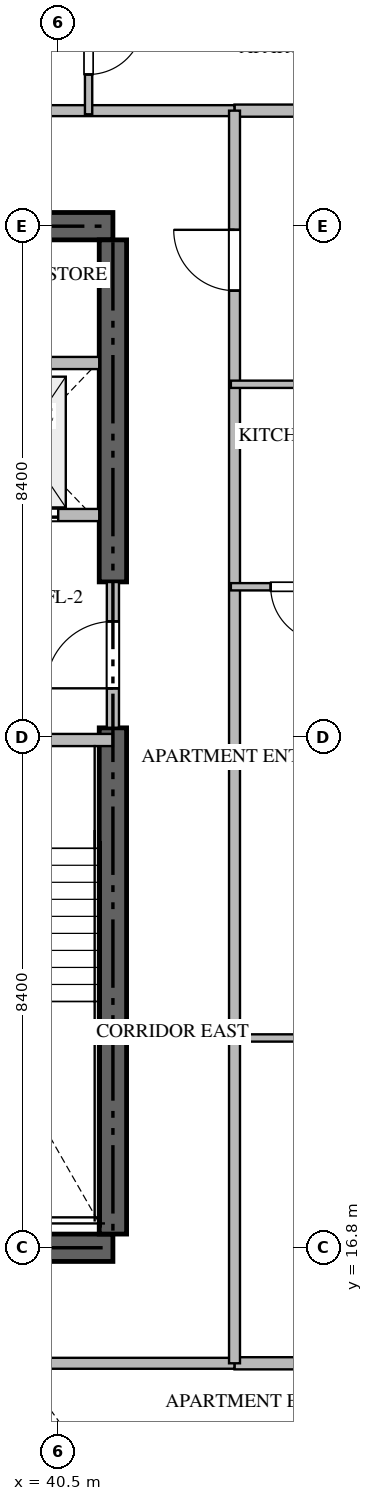
"""IFC4 building model, lengths in metres.
Left out: names, types, materials, properties, quantities, classifications, styles, units other than length and angle.
Written with IfcOpenShell. Run it as: python <this file> out.ifc"""

import sys

from ifc_helpers import new_model, si_unit, direction, frame, frame_2d, origin, place, context, subcontext, project, spatial, rectangle, extrude, source, transform, mapped, element, fill, save


model = new_model("IFC4")
c1 = context("Model", 3, precision=1e-05, world=origin(), true_north=direction((0.0, 1.0)))
c2 = subcontext(c1, "Body", "Model", "MODEL_VIEW")
j1 = project(units=[si_unit("LENGTHUNIT", "METRE"), si_unit("PLANEANGLEUNIT", "RADIAN")], contexts=[c1])
p1 = place(None, origin())
s1 = spatial("IfcSite", under=j1, at=p1, CompositionType="ELEMENT")
p2 = place(p1, origin())
s2 = spatial("IfcBuilding", under=s1, at=p2, CompositionType="ELEMENT")
p3 = place(p2, frame((0.0, 0.0, 94.2)))
s3 = spatial("IfcBuildingStorey", under=s2, at=p3, CompositionType="ELEMENT", Elevation=94.2)
for number, where, z_axis, x_axis in (
    (1, (23.4, 16.8, -0.26), (0.0, 0.0, 1.0), (1.0, 0.0, 0.0)),
    (2, (41.4, 33.6, -0.26), (0.0, 0.0, 1.0), (-1.0, 0.0, 0.0)),
):
    element("IfcWall", number, at=place(p3, frame(where, z_axis=z_axis, x_axis=x_axis)), inside=s3, PredefinedType="SHEAR", context=c2, shape_type="SweptSolid", body=[
        extrude(rectangle(XDim=18.0, YDim=0.45, at=frame_2d((9.0, 0.0))), origin(), (0.0, 0.0, 1.0), 3.748),
    ])
p4 = place(p3, frame((41.4, 17.025, -0.26), z_axis=(0.0, 0.0, 1.0), x_axis=(0.0, 1.0, 0.0)))
e3 = element("IfcWall", 3, at=p4, inside=s3, PredefinedType="SHEAR", context=c2, shape_type="SweptSolid", body=[
    extrude(rectangle(XDim=8.325, YDim=0.45, at=frame_2d((4.163, 0.0))), origin(), (0.0, 0.0, 1.0), 3.748),
])
p5 = place(p3, frame((41.4, 27.75, -0.26), z_axis=(0.0, 0.0, 1.0), x_axis=(0.0, 1.0, 0.0)))
e4 = element("IfcWall", 4, at=p5, inside=s3, PredefinedType="SHEAR", context=c2, shape_type="SweptSolid", body=[
    extrude(rectangle(XDim=5.625, YDim=0.45, at=frame_2d((2.812, 0.0))), origin(), (0.0, 0.0, 1.0), 3.748),
])
p6 = place(p3, frame((36.95, 25.15, 0.0), z_axis=(0.0, 0.0, 1.0), x_axis=(1.0, 0.0, 0.0)))
e5 = element("IfcWall", 5, at=p6, inside=s3, PredefinedType="STANDARD", context=c2, shape_type="SweptSolid", body=[
    extrude(rectangle(XDim=4.45, YDim=0.2, at=frame_2d((2.225, 0.0))), origin(), (0.0, 0.0, 1.0), 3.49),
])
p7 = place(p6, frame((1.65, 0.0, 0.0)))
e6 = element("IfcOpeningElement", 6, at=p7, cuts=e5, PredefinedType="OPENING", context=c2, shape_type="SweptSolid", body=[
    extrude(rectangle(XDim=1.1, YDim=2.15, at=frame_2d((0.55, 1.075))), frame((0.0, 0.11, 0.0), z_axis=(0.0, -1.0, 0.0), x_axis=(1.0, 0.0, 0.0)), (0.0, 0.0, 1.0), 0.22),
])
p8 = place(p3, frame((38.75, 28.85, 0.0), z_axis=(0.0, 0.0, 1.0), x_axis=(1.0, 0.0, 0.0)))
e7 = element("IfcWall", 7, at=p8, inside=s3, PredefinedType="STANDARD", context=c2, shape_type="SweptSolid", body=[
    extrude(rectangle(XDim=2.425, YDim=0.2, at=frame_2d((1.212, 0.0))), origin(), (0.0, 0.0, 1.0), 3.49),
])
p9 = place(p8, frame((0.55, 0.0, 0.0)))
e8 = element("IfcOpeningElement", 8, at=p9, cuts=e7, PredefinedType="OPENING", context=c2, shape_type="SweptSolid", body=[
    extrude(rectangle(XDim=1.2, YDim=2.2, at=frame_2d((0.6, 1.1))), frame((0.0, 0.11, 0.0), z_axis=(0.0, -1.0, 0.0), x_axis=(1.0, 0.0, 0.0)), (0.0, 0.0, 1.0), 0.22),
])
p10 = place(p3, frame((38.75, 31.35, 0.0), z_axis=(0.0, 0.0, 1.0), x_axis=(1.0, 0.0, 0.0)))
e9 = element("IfcWall", 9, at=p10, inside=s3, PredefinedType="STANDARD", context=c2, shape_type="SweptSolid", body=[
    extrude(rectangle(XDim=2.425, YDim=0.2, at=frame_2d((1.212, 0.0))), origin(), (0.0, 0.0, 1.0), 3.49),
])
p11 = place(p3, frame((41.4, 25.352, 0.0), z_axis=(0.0, 0.0, 1.0), x_axis=(0.0, 1.0, 0.0)))
e10 = element("IfcWall", 10, at=p11, inside=s3, PredefinedType="STANDARD", context=c2, shape_type="SweptSolid", body=[
    extrude(rectangle(XDim=2.396, YDim=0.2, at=frame_2d((1.198, 0.0))), origin(), (0.0, 0.0, 1.0), 3.49),
])
p12 = place(p11, frame((0.648, 0.0, 0.0)))
e11 = element("IfcOpeningElement", 11, at=p12, cuts=e10, PredefinedType="OPENING", context=c2, shape_type="SweptSolid", body=[
    extrude(rectangle(XDim=1.1, YDim=2.15, at=frame_2d((0.55, 1.075))), frame((0.0, 0.11, 0.0), z_axis=(0.0, -1.0, 0.0), x_axis=(1.0, 0.0, 0.0)), (0.0, 0.0, 1.0), 0.22),
])
for number, where, z_axis, x_axis in (
    (12, (43.4, 14.9, 0.0), (0.0, 0.0, 1.0), (1.0, 0.0, 0.0)),
    (13, (43.4, 35.5, 0.0), (0.0, 0.0, 1.0), (1.0, 0.0, 0.0)),
):
    element("IfcWall", number, at=place(p3, frame(where, z_axis=z_axis, x_axis=x_axis)), inside=s3, PredefinedType="PARTITIONING", context=c2, shape_type="SweptSolid", body=[
        extrude(rectangle(XDim=15.318, YDim=0.2, at=frame_2d((7.659, 0.0))), origin(), (0.0, 0.0, 1.0), 3.49),
    ])
p13 = place(p3, frame((21.402, 14.9, 0.0), z_axis=(0.0, 0.0, 1.0), x_axis=(1.0, 0.0, 0.0)))
e14 = element("IfcWall", 14, at=p13, inside=s3, PredefinedType="PARTITIONING", context=c2, shape_type="SweptSolid", body=[
    extrude(rectangle(XDim=21.996, YDim=0.18, at=frame_2d((10.998, 0.0))), origin(), (0.0, 0.0, 1.0), 3.49),
])
p14 = place(p13, frame((15.222, 0.0, 0.0)))
e15 = element("IfcOpeningElement", 15, at=p14, cuts=e14, PredefinedType="OPENING", context=c2, shape_type="SweptSolid", body=[
    extrude(rectangle(XDim=1.0, YDim=2.15, at=frame_2d((0.5, 1.075))), frame((0.0, 0.1, 0.0), z_axis=(0.0, -1.0, 0.0), x_axis=(1.0, 0.0, 0.0)), (0.0, 0.0, 1.0), 0.2),
])
p15 = place(p3, frame((21.402, 35.5, 0.0), z_axis=(0.0, 0.0, 1.0), x_axis=(1.0, 0.0, 0.0)))
e16 = element("IfcWall", 16, at=p15, inside=s3, PredefinedType="PARTITIONING", context=c2, shape_type="SweptSolid", body=[
    extrude(rectangle(XDim=21.996, YDim=0.18, at=frame_2d((10.998, 0.0))), origin(), (0.0, 0.0, 1.0), 3.49),
])
p16 = place(p15, frame((7.454, 0.0, 0.0)))
e17 = element("IfcOpeningElement", 17, at=p16, cuts=e16, PredefinedType="OPENING", context=c2, shape_type="SweptSolid", body=[
    extrude(rectangle(XDim=1.0, YDim=2.15, at=frame_2d((0.5, 1.075))), frame((0.0, 0.1, 0.0), z_axis=(0.0, -1.0, 0.0), x_axis=(1.0, 0.0, 0.0)), (0.0, 0.0, 1.0), 0.2),
])
p17 = place(p15, frame((13.542, 0.0, 0.0)))
e18 = element("IfcOpeningElement", 18, at=p17, cuts=e16, PredefinedType="OPENING", context=c2, shape_type="SweptSolid", body=[
    extrude(rectangle(XDim=1.0, YDim=2.15, at=frame_2d((0.5, 1.075))), frame((0.0, 0.1, 0.0), z_axis=(0.0, -1.0, 0.0), x_axis=(1.0, 0.0, 0.0)), (0.0, 0.0, 1.0), 0.2),
])
p18 = place(p3, frame((43.4, 14.9, 0.0), z_axis=(0.0, 0.0, 1.0), x_axis=(0.0, 1.0, 0.0)))
e19 = element("IfcWall", 19, at=p18, inside=s3, PredefinedType="PARTITIONING", context=c2, shape_type="SweptSolid", body=[
    extrude(rectangle(XDim=20.6, YDim=0.18, at=frame_2d((10.3, 0.0))), origin(), (0.0, 0.0, 1.0), 3.49),
])
p19 = place(p18, frame((17.64, 0.0, 0.0)))
e20 = element("IfcOpeningElement", 20, at=p19, cuts=e19, PredefinedType="OPENING", context=c2, shape_type="SweptSolid", body=[
    extrude(rectangle(XDim=1.0, YDim=2.15, at=frame_2d((0.5, 1.075))), frame((0.0, 0.1, 0.0), z_axis=(0.0, -1.0, 0.0), x_axis=(1.0, 0.0, 0.0)), (0.0, 0.0, 1.0), 0.2),
])
p20 = place(p3, frame((41.0, 37.65, 0.0), z_axis=(0.0, 0.0, 1.0), x_axis=(0.0, -1.0, 0.0)))
e21 = element("IfcWall", 21, at=p20, inside=s3, PredefinedType="PARTITIONING", context=c2, shape_type="SweptSolid", body=[
    extrude(rectangle(XDim=2.21, YDim=0.12, at=frame_2d((1.105, 0.0))), origin(), (0.0, 0.0, 1.0), 3.49),
])
p21 = place(p20, frame((0.655, 0.0, 0.0)))
e22 = element("IfcOpeningElement", 22, at=p21, cuts=e21, PredefinedType="OPENING", context=c2, shape_type="SweptSolid", body=[
    extrude(rectangle(XDim=0.9, YDim=2.1, at=frame_2d((0.45, 1.05))), frame((0.0, 0.07, 0.0), z_axis=(0.0, -1.0, 0.0), x_axis=(1.0, 0.0, 0.0)), (0.0, 0.0, 1.0), 0.14),
])
p22 = place(p3, frame((46.15, 31.0, 0.0), z_axis=(0.0, 0.0, 1.0), x_axis=(-1.0, 0.0, 0.0)))
e23 = element("IfcWall", 23, at=p22, inside=s3, PredefinedType="PARTITIONING", context=c2, shape_type="SweptSolid", body=[
    extrude(rectangle(XDim=2.81, YDim=0.12, at=frame_2d((1.405, 0.0))), origin(), (0.0, 0.0, 1.0), 3.49),
])
p23 = place(p3, frame((45.55, 27.67, 0.0), z_axis=(0.0, 0.0, 1.0), x_axis=(-1.0, 0.0, 0.0)))
e24 = element("IfcWall", 24, at=p23, inside=s3, PredefinedType="PARTITIONING", context=c2, shape_type="SweptSolid", body=[
    extrude(rectangle(XDim=2.21, YDim=0.12, at=frame_2d((1.105, 0.0))), origin(), (0.0, 0.0, 1.0), 3.49),
])
p24 = place(p23, frame((0.655, 0.0, 0.0)))
e25 = element("IfcOpeningElement", 25, at=p24, cuts=e24, PredefinedType="OPENING", context=c2, shape_type="SweptSolid", body=[
    extrude(rectangle(XDim=0.9, YDim=2.1, at=frame_2d((0.45, 1.05))), frame((0.0, 0.07, 0.0), z_axis=(0.0, -1.0, 0.0), x_axis=(1.0, 0.0, 0.0)), (0.0, 0.0, 1.0), 0.14),
])
p25 = place(p3, frame((45.548, 20.25, 0.0), z_axis=(0.0, 0.0, 1.0), x_axis=(-1.0, 0.0, 0.0)))
e26 = element("IfcWall", 26, at=p25, inside=s3, PredefinedType="PARTITIONING", context=c2, shape_type="SweptSolid", body=[
    extrude(rectangle(XDim=2.208, YDim=0.12, at=frame_2d((1.104, 0.0))), origin(), (0.0, 0.0, 1.0), 3.49),
])
m1 = source(origin(), c2, "Body", "SweptSolid", [
    extrude(rectangle(XDim=1.2, YDim=2.2, at=frame_2d((0.6, 1.1))), frame((0.0, 0.025, 0.0), z_axis=(0.0, -1.0, 0.0), x_axis=(1.0, 0.0, 0.0)), (0.0, 0.0, 1.0), 0.05),
])
p26 = place(p9, origin())
e27 = element("IfcDoor", 27, at=p26, inside=s3, OperationType="DOUBLE_DOOR_SLIDING", PredefinedType="DOOR", context=c2, shape_type="MappedRepresentation", body=[
    mapped(m1, transform((0.0, 0.0, 0.0), scale=1.0)),
])
fill(e8, e27)
m2 = source(origin(), c2, "Body", "SweptSolid", [
    extrude(rectangle(XDim=1.1, YDim=2.15, at=frame_2d((0.55, 1.075))), frame((0.0, 0.025, 0.0), z_axis=(0.0, -1.0, 0.0), x_axis=(1.0, 0.0, 0.0)), (0.0, 0.0, 1.0), 0.05),
])
p27 = place(p12, origin())
e28 = element("IfcDoor", 28, at=p27, inside=s3, OperationType="SINGLE_SWING_LEFT", PredefinedType="DOOR", context=c2, shape_type="MappedRepresentation", body=[
    mapped(m2, transform((0.0, 0.0, 0.0), scale=1.0)),
])
fill(e11, e28)
m3 = source(origin(), c2, "Body", "SweptSolid", [
    extrude(rectangle(XDim=1.0, YDim=2.15, at=frame_2d((0.5, 1.075))), frame((0.0, 0.025, 0.0), z_axis=(0.0, -1.0, 0.0), x_axis=(1.0, 0.0, 0.0)), (0.0, 0.0, 1.0), 0.05),
])
p28 = place(p19, origin())
e29 = element("IfcDoor", 29, at=p28, inside=s3, OperationType="SINGLE_SWING_RIGHT", PredefinedType="DOOR", context=c2, shape_type="MappedRepresentation", body=[
    mapped(m3, transform((0.0, 0.0, 0.0), scale=1.0)),
])
fill(e20, e29)
m4 = source(origin(), c2, "Body", "SweptSolid", [
    extrude(rectangle(XDim=0.9, YDim=2.1, at=frame_2d((0.45, 1.05))), frame((0.0, 0.025, 0.0), z_axis=(0.0, -1.0, 0.0), x_axis=(1.0, 0.0, 0.0)), (0.0, 0.0, 1.0), 0.05),
])
p29 = place(p21, origin())
e30 = element("IfcDoor", 30, at=p29, inside=s3, OperationType="SINGLE_SWING_LEFT", PredefinedType="DOOR", context=c2, shape_type="MappedRepresentation", body=[
    mapped(m4, transform((0.0, 0.0, 0.0), scale=1.0)),
])
fill(e22, e30)
p30 = place(p24, origin())
e31 = element("IfcDoor", 31, at=p30, inside=s3, OperationType="SINGLE_SWING_LEFT", PredefinedType="DOOR", context=c2, shape_type="MappedRepresentation", body=[
    mapped(m4, transform((0.0, 0.0, 0.0), scale=1.0)),
])
fill(e25, e31)
save(model, sys.argv[1])
